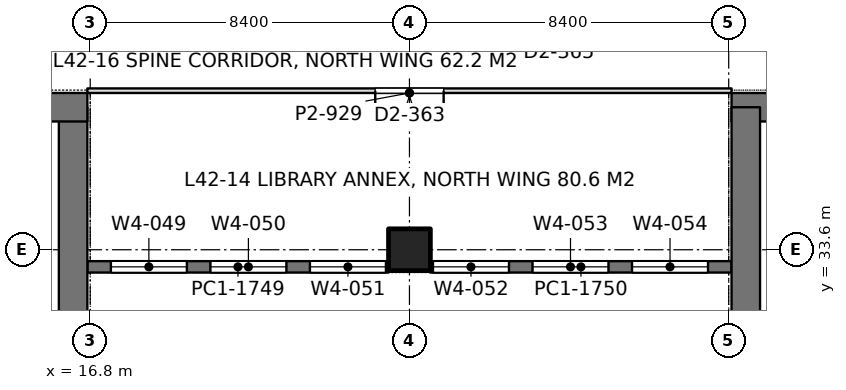
"""IFC4 building model, lengths in metres.
Left out: names, types, materials, properties, quantities, classifications, styles, units other than length and angle.
Written with IfcOpenShell. Run it as: python <this file> out.ifc"""

import sys

from ifc_helpers import new_model, si_unit, direction, frame, frame_2d, origin, origin_2d, place, context, subcontext, project, spatial, rectangle, extrude, element, fill, save


model = new_model("IFC4")
c1 = context("Model", 3, precision=1e-05, world=origin(), true_north=direction((0.0, 1.0)))
c2 = subcontext(c1, "Body", "Model", "MODEL_VIEW")
j1 = project(units=[si_unit("LENGTHUNIT", "METRE"), si_unit("PLANEANGLEUNIT", "RADIAN")], contexts=[c1])
p1 = place(None, origin())
s1 = spatial("IfcSite", under=j1, at=p1, CompositionType="ELEMENT")
p2 = place(p1, origin())
s2 = spatial("IfcBuilding", under=s1, at=p2, CompositionType="ELEMENT")
p3 = place(p2, frame((0.0, 0.0, 186.0)))
s3 = spatial("IfcBuildingStorey", under=s2, at=p3, CompositionType="ELEMENT", Elevation=186.0)
p4 = place(p3, frame((25.2, 33.6, 0.0), z_axis=(0.0, 0.0, 1.0), x_axis=(1.0, 0.0, 0.0)))
e1 = element("IfcColumn", 1, at=p4, inside=s3, PredefinedType="COLUMN", context=c2, shape_type="SweptSolid", body=[
    extrude(rectangle(XDim=1.1, YDim=1.1, at=origin_2d()), origin(), (0.0, 0.0, 1.0), 4.2),
])
p5 = place(p3, frame((-1.125, 37.35, 0.0), z_axis=(0.0, 0.0, 1.0), x_axis=(1.0, 0.0, 0.0)))
e2 = element("IfcWall", 2, at=p5, inside=s3, PredefinedType="SHEAR", context=c2, shape_type="SweptSolid", body=[
    extrude(rectangle(XDim=17.85, YDim=0.75, at=frame_2d((8.925, 0.0))), origin(), (0.0, 0.0, 1.0), 4.2),
])
p6 = place(p5, frame((8.875, 0.0, 0.0)))
e3 = element("IfcOpeningElement", 3, at=p6, cuts=e2, PredefinedType="OPENING", context=c2, shape_type="SweptSolid", body=[
    extrude(rectangle(XDim=1.8, YDim=2.4, at=frame_2d((0.9, 1.2))), frame((0.0, 0.385, 0.0), z_axis=(0.0, -1.0, 0.0), x_axis=(1.0, 0.0, 0.0)), (0.0, 0.0, 1.0), 0.77),
])
p7 = place(p3, frame((16.35, 27.8, 0.0), z_axis=(0.0, 0.0, 1.0), x_axis=(0.0, 1.0, 0.0)))
e4 = element("IfcWall", 4, at=p7, inside=s3, PredefinedType="SHEAR", context=c2, shape_type="SweptSolid", body=[
    extrude(rectangle(XDim=9.55, YDim=0.75, at=frame_2d((4.775, 0.0))), origin(), (0.0, 0.0, 1.0), 4.2),
])
p8 = place(p3, frame((33.675, 37.35, 0.0), z_axis=(0.0, 0.0, 1.0), x_axis=(1.0, 0.0, 0.0)))
e5 = element("IfcWall", 5, at=p8, inside=s3, PredefinedType="SHEAR", context=c2, shape_type="SweptSolid", body=[
    extrude(rectangle(XDim=17.85, YDim=0.75, at=frame_2d((8.925, 0.0))), origin(), (0.0, 0.0, 1.0), 4.2),
])
p9 = place(p8, frame((7.175, 0.0, 0.0)))
e6 = element("IfcOpeningElement", 6, at=p9, cuts=e5, PredefinedType="OPENING", context=c2, shape_type="SweptSolid", body=[
    extrude(rectangle(XDim=1.8, YDim=2.4, at=frame_2d((0.9, 1.2))), frame((0.0, 0.385, 0.0), z_axis=(0.0, -1.0, 0.0), x_axis=(1.0, 0.0, 0.0)), (0.0, 0.0, 1.0), 0.77),
])
p10 = place(p3, frame((34.05, 27.8, 0.0), z_axis=(0.0, 0.0, 1.0), x_axis=(0.0, 1.0, 0.0)))
e7 = element("IfcWall", 7, at=p10, inside=s3, PredefinedType="SHEAR", context=c2, shape_type="SweptSolid", body=[
    extrude(rectangle(XDim=9.55, YDim=0.75, at=frame_2d((4.775, 0.0))), origin(), (0.0, 0.0, 1.0), 4.2),
])
p11 = place(p3, frame((16.725, 33.15, 0.0), z_axis=(0.0, 0.0, 1.0), x_axis=(1.0, 0.0, 0.0)))
e8 = element("IfcWall", 8, at=p11, inside=s3, PredefinedType="SOLIDWALL", context=c2, shape_type="SweptSolid", body=[
    extrude(rectangle(XDim=7.925, YDim=0.3, at=frame_2d((3.962, 0.0))), origin(), (0.0, 0.0, 1.0), 4.05),
])
p12 = place(p11, frame((0.619, 0.0, 0.9)))
e9 = element("IfcOpeningElement", 9, at=p12, cuts=e8, PredefinedType="OPENING", context=c2, shape_type="SweptSolid", body=[
    extrude(rectangle(XDim=2.0, YDim=1.9, at=frame_2d((1.0, 0.95))), frame((0.0, 0.16, 0.0), z_axis=(0.0, -1.0, 0.0), x_axis=(1.0, 0.0, 0.0)), (0.0, 0.0, 1.0), 0.32),
])
p13 = place(p11, frame((3.238, 0.0, 0.9)))
e10 = element("IfcOpeningElement", 10, at=p13, cuts=e8, PredefinedType="OPENING", context=c2, shape_type="SweptSolid", body=[
    extrude(rectangle(XDim=2.0, YDim=1.9, at=frame_2d((1.0, 0.95))), frame((0.0, 0.16, 0.0), z_axis=(0.0, -1.0, 0.0), x_axis=(1.0, 0.0, 0.0)), (0.0, 0.0, 1.0), 0.32),
])
p14 = place(p11, frame((5.856, 0.0, 0.9)))
e11 = element("IfcOpeningElement", 11, at=p14, cuts=e8, PredefinedType="OPENING", context=c2, shape_type="SweptSolid", body=[
    extrude(rectangle(XDim=2.0, YDim=1.9, at=frame_2d((1.0, 0.95))), frame((0.0, 0.16, 0.0), z_axis=(0.0, -1.0, 0.0), x_axis=(1.0, 0.0, 0.0)), (0.0, 0.0, 1.0), 0.32),
])
p15 = place(p3, frame((25.75, 33.15, 0.0), z_axis=(0.0, 0.0, 1.0), x_axis=(1.0, 0.0, 0.0)))
e12 = element("IfcWall", 12, at=p15, inside=s3, PredefinedType="SOLIDWALL", context=c2, shape_type="SweptSolid", body=[
    extrude(rectangle(XDim=7.925, YDim=0.3, at=frame_2d((3.962, 0.0))), origin(), (0.0, 0.0, 1.0), 4.05),
])
p16 = place(p15, frame((0.069, 0.0, 0.9)))
e13 = element("IfcOpeningElement", 13, at=p16, cuts=e12, PredefinedType="OPENING", context=c2, shape_type="SweptSolid", body=[
    extrude(rectangle(XDim=2.0, YDim=1.9, at=frame_2d((1.0, 0.95))), frame((0.0, 0.16, 0.0), z_axis=(0.0, -1.0, 0.0), x_axis=(1.0, 0.0, 0.0)), (0.0, 0.0, 1.0), 0.32),
])
p17 = place(p15, frame((2.688, 0.0, 0.9)))
e14 = element("IfcOpeningElement", 14, at=p17, cuts=e12, PredefinedType="OPENING", context=c2, shape_type="SweptSolid", body=[
    extrude(rectangle(XDim=2.0, YDim=1.9, at=frame_2d((1.0, 0.95))), frame((0.0, 0.16, 0.0), z_axis=(0.0, -1.0, 0.0), x_axis=(1.0, 0.0, 0.0)), (0.0, 0.0, 1.0), 0.32),
])
p18 = place(p15, frame((5.306, 0.0, 0.9)))
e15 = element("IfcOpeningElement", 15, at=p18, cuts=e12, PredefinedType="OPENING", context=c2, shape_type="SweptSolid", body=[
    extrude(rectangle(XDim=2.0, YDim=1.9, at=frame_2d((1.0, 0.95))), frame((0.0, 0.16, 0.0), z_axis=(0.0, -1.0, 0.0), x_axis=(1.0, 0.0, 0.0)), (0.0, 0.0, 1.0), 0.32),
])
p19 = place(p3, frame((16.725, 37.785, 0.0), z_axis=(0.0, 0.0, 1.0), x_axis=(1.0, 0.0, 0.0)))
e16 = element("IfcWall", 16, at=p19, inside=s3, PredefinedType="PARTITIONING", context=c2, shape_type="SweptSolid", body=[
    extrude(rectangle(XDim=16.95, YDim=0.12, at=frame_2d((8.475, 0.0))), origin(), (0.0, 0.0, 1.0), 3.55),
])
p20 = place(p19, frame((7.575, 0.0, 0.0)))
e17 = element("IfcOpeningElement", 17, at=p20, cuts=e16, PredefinedType="OPENING", context=c2, shape_type="SweptSolid", body=[
    extrude(rectangle(XDim=1.8, YDim=2.2, at=frame_2d((0.9, 1.1))), frame((0.0, 0.07, 0.0), z_axis=(0.0, -1.0, 0.0), x_axis=(1.0, 0.0, 0.0)), (0.0, 0.0, 1.0), 0.14),
])
p21 = place(p12, origin())
e18 = element("IfcWindow", 18, at=p21, inside=s3, PartitioningType="SINGLE_PANEL", PredefinedType="WINDOW", context=c2, shape_type="SweptSolid", body=[
    extrude(rectangle(XDim=2.0, YDim=1.9, at=frame_2d((1.0, 0.95))), frame((0.0, 0.03, 0.0), z_axis=(0.0, -1.0, 0.0), x_axis=(1.0, 0.0, 0.0)), (0.0, 0.0, 1.0), 0.06),
])
fill(e9, e18)
p22 = place(p13, origin())
e19 = element("IfcWindow", 19, at=p22, inside=s3, PartitioningType="SINGLE_PANEL", PredefinedType="WINDOW", context=c2, shape_type="SweptSolid", body=[
    extrude(rectangle(XDim=2.0, YDim=1.9, at=frame_2d((1.0, 0.95))), frame((0.0, 0.03, 0.0), z_axis=(0.0, -1.0, 0.0), x_axis=(1.0, 0.0, 0.0)), (0.0, 0.0, 1.0), 0.06),
])
fill(e10, e19)
p23 = place(p14, origin())
e20 = element("IfcWindow", 20, at=p23, inside=s3, PartitioningType="SINGLE_PANEL", PredefinedType="WINDOW", context=c2, shape_type="SweptSolid", body=[
    extrude(rectangle(XDim=2.0, YDim=1.9, at=frame_2d((1.0, 0.95))), frame((0.0, 0.03, 0.0), z_axis=(0.0, -1.0, 0.0), x_axis=(1.0, 0.0, 0.0)), (0.0, 0.0, 1.0), 0.06),
])
fill(e11, e20)
p24 = place(p16, origin())
e21 = element("IfcWindow", 21, at=p24, inside=s3, PartitioningType="SINGLE_PANEL", PredefinedType="WINDOW", context=c2, shape_type="SweptSolid", body=[
    extrude(rectangle(XDim=2.0, YDim=1.9, at=frame_2d((1.0, 0.95))), frame((0.0, 0.03, 0.0), z_axis=(0.0, -1.0, 0.0), x_axis=(1.0, 0.0, 0.0)), (0.0, 0.0, 1.0), 0.06),
])
fill(e13, e21)
p25 = place(p17, origin())
e22 = element("IfcWindow", 22, at=p25, inside=s3, PartitioningType="SINGLE_PANEL", PredefinedType="WINDOW", context=c2, shape_type="SweptSolid", body=[
    extrude(rectangle(XDim=2.0, YDim=1.9, at=frame_2d((1.0, 0.95))), frame((0.0, 0.03, 0.0), z_axis=(0.0, -1.0, 0.0), x_axis=(1.0, 0.0, 0.0)), (0.0, 0.0, 1.0), 0.06),
])
fill(e14, e22)
p26 = place(p18, origin())
e23 = element("IfcWindow", 23, at=p26, inside=s3, PartitioningType="SINGLE_PANEL", PredefinedType="WINDOW", context=c2, shape_type="SweptSolid", body=[
    extrude(rectangle(XDim=2.0, YDim=1.9, at=frame_2d((1.0, 0.95))), frame((0.0, 0.03, 0.0), z_axis=(0.0, -1.0, 0.0), x_axis=(1.0, 0.0, 0.0)), (0.0, 0.0, 1.0), 0.06),
])
fill(e15, e23)
p27 = place(p20, frame((1.8, 0.0, 0.0), z_axis=(0.0, 0.0, 1.0), x_axis=(-1.0, 0.0, 0.0)))
e24 = element("IfcDoor", 24, at=p27, inside=s3, OperationType="DOUBLE_DOOR_SINGLE_SWING", PredefinedType="DOOR", context=c2, shape_type="SweptSolid", body=[
    extrude(rectangle(XDim=1.8, YDim=2.2, at=frame_2d((0.9, 1.1))), frame((0.0, 0.025, 0.0), z_axis=(0.0, -1.0, 0.0), x_axis=(1.0, 0.0, 0.0)), (0.0, 0.0, 1.0), 0.05),
])
fill(e17, e24)
save(model, sys.argv[1])
